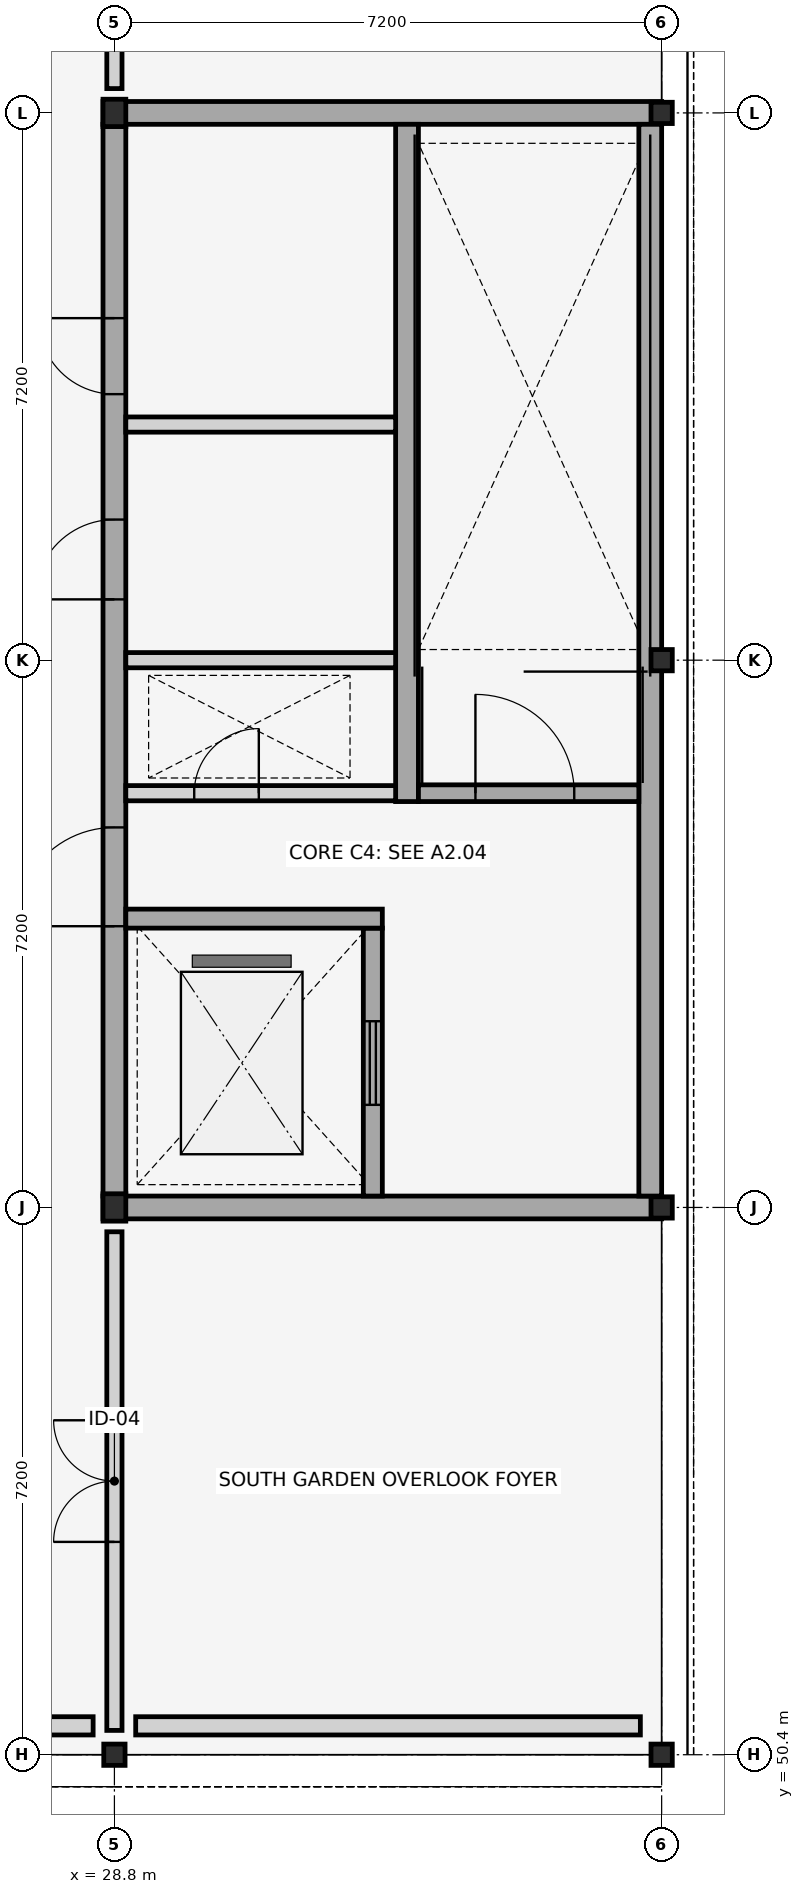
"""IFC4 building model, lengths in metres.
Left out: names, types, materials, properties, quantities, classifications, styles, units other than length and angle.
Written with IfcOpenShell. Run it as: python <this file> out.ifc"""

import sys

from ifc_helpers import new_model, si_unit, direction, frame, frame_2d, origin, origin_2d, place, context, subcontext, project, spatial, rectangle, i_section, extrude, element, fill, save


model = new_model("IFC4")
c1 = context("Model", 3, precision=1e-05, world=origin(), true_north=direction((0.0, 1.0)))
c2 = subcontext(c1, "Body", "Model", "MODEL_VIEW")
j1 = project(units=[si_unit("LENGTHUNIT", "METRE"), si_unit("PLANEANGLEUNIT", "RADIAN")], contexts=[c1])
p1 = place(None, origin())
s1 = spatial("IfcSite", under=j1, at=p1, CompositionType="ELEMENT")
p2 = place(p1, origin())
s2 = spatial("IfcBuilding", under=s1, at=p2, CompositionType="ELEMENT")
p3 = place(p2, frame((0.0, 0.0, 12.9)))
s3 = spatial("IfcBuildingStorey", under=s2, at=p3, CompositionType="ELEMENT", Elevation=12.9)
p4 = place(p3, frame((28.8, 50.4, 0.0), z_axis=(0.0, 0.0, 1.0), x_axis=(0.0, 1.0, 0.0)))
e1 = element("IfcColumn", 1, at=p4, inside=s3, PredefinedType="COLUMN", context=c2, shape_type="SweptSolid", body=[
    extrude(i_section(OverallWidth=0.28, OverallDepth=0.28, WebThickness=0.01, FlangeThickness=0.018, FilletRadius=0.024, at=origin_2d()), origin(), (0.0, 0.0, 1.0), 4.2),
])
for number, where, z_axis, x_axis in (
    (2, (28.8, 57.6, 0.0), (0.0, 0.0, 1.0), (1.0, 0.0, 0.0)),
    (3, (28.8, 72.0, 0.0), (0.0, 0.0, 1.0), (1.0, 0.0, 0.0)),
):
    element("IfcColumn", number, at=place(p3, frame(where, z_axis=z_axis, x_axis=x_axis)), inside=s3, PredefinedType="COLUMN", context=c2, shape_type="SweptSolid", body=[
        extrude(i_section(OverallWidth=0.3, OverallDepth=0.36, WebThickness=0.012, FlangeThickness=0.022, FilletRadius=0.027, at=origin_2d()), origin(), (0.0, 0.0, 1.0), 4.2),
    ])
for number, where, z_axis, x_axis in (
    (4, (36.0, 50.4, 0.0), (0.0, 0.0, 1.0), (1.0, 0.0, 0.0)),
    (5, (36.0, 57.6, 0.0), (0.0, 0.0, 1.0), (0.0, 1.0, 0.0)),
    (6, (36.0, 64.8, 0.0), (0.0, 0.0, 1.0), (1.0, 0.0, 0.0)),
    (7, (36.0, 72.0, 0.0), (0.0, 0.0, 1.0), (0.0, 1.0, 0.0)),
):
    element("IfcColumn", number, at=place(p3, frame(where, z_axis=z_axis, x_axis=x_axis)), inside=s3, PredefinedType="COLUMN", context=c2, shape_type="SweptSolid", body=[
        extrude(i_section(OverallWidth=0.28, OverallDepth=0.28, WebThickness=0.01, FlangeThickness=0.018, FilletRadius=0.024, at=origin_2d()), origin(), (0.0, 0.0, 1.0), 4.2),
    ])
p5 = place(p3, frame((21.88, 50.78, 0.0), z_axis=(0.0, 0.0, 1.0), x_axis=(1.0, 0.0, 0.0)))
e8 = element("IfcWall", 8, at=p5, inside=s3, PredefinedType="STANDARD", context=c2, shape_type="SweptSolid", body=[
    extrude(rectangle(XDim=6.64, YDim=0.24, at=frame_2d((3.32, 0.0))), origin(), (0.0, 0.0, 1.0), 3.58),
])
p6 = place(p3, frame((29.08, 50.78, 0.0), z_axis=(0.0, 0.0, 1.0), x_axis=(1.0, 0.0, 0.0)))
e9 = element("IfcWall", 9, at=p6, inside=s3, PredefinedType="STANDARD", context=c2, shape_type="SweptSolid", body=[
    extrude(rectangle(XDim=6.64, YDim=0.24, at=frame_2d((3.32, 0.0))), origin(), (0.0, 0.0, 1.0), 3.58),
])
for number, where, z_axis, x_axis in (
    (10, (28.65, 57.6, 0.0), (0.0, 0.0, 1.0), (1.0, 0.0, 0.0)),
    (11, (28.65, 72.0, 0.0), (0.0, 0.0, 1.0), (1.0, 0.0, 0.0)),
):
    element("IfcWall", number, at=place(p3, frame(where, z_axis=z_axis, x_axis=x_axis)), inside=s3, PredefinedType="SHEAR", context=c2, shape_type="SweptSolid", body=[
        extrude(rectangle(XDim=7.35, YDim=0.3, at=frame_2d((3.675, 0.0))), origin(), (0.0, 0.0, 1.0), 3.96),
    ])
p7 = place(p3, frame((35.85, 57.75, 0.0), z_axis=(0.0, 0.0, 1.0), x_axis=(0.0, 1.0, 0.0)))
e12 = element("IfcWall", 12, at=p7, inside=s3, PredefinedType="SHEAR", context=c2, shape_type="SweptSolid", body=[
    extrude(rectangle(XDim=14.1, YDim=0.3, at=frame_2d((7.05, 0.0))), origin(), (0.0, 0.0, 1.0), 3.96),
])
p8 = place(p3, frame((28.8, 57.75, 0.0), z_axis=(0.0, 0.0, 1.0), x_axis=(0.0, 1.0, 0.0)))
e13 = element("IfcWall", 13, at=p8, inside=s3, PredefinedType="SHEAR", context=c2, shape_type="SweptSolid", body=[
    extrude(rectangle(XDim=14.1, YDim=0.3, at=frame_2d((7.05, 0.0))), origin(), (0.0, 0.0, 1.0), 3.96),
])
p9 = place(p8, frame((3.55, 0.0, 0.0)))
e14 = element("IfcOpeningElement", 14, at=p9, cuts=e13, PredefinedType="OPENING", context=c2, shape_type="SweptSolid", body=[
    extrude(rectangle(XDim=1.3, YDim=2.2, at=frame_2d((0.65, 1.1))), frame((0.0, 0.16, 0.0), z_axis=(0.0, -1.0, 0.0), x_axis=(1.0, 0.0, 0.0)), (0.0, 0.0, 1.0), 0.32),
])
p10 = place(p8, frame((7.85, 0.0, 0.0)))
e15 = element("IfcOpeningElement", 15, at=p10, cuts=e13, PredefinedType="OPENING", context=c2, shape_type="SweptSolid", body=[
    extrude(rectangle(XDim=1.05, YDim=2.15, at=frame_2d((0.525, 1.075))), frame((0.0, 0.16, 0.0), z_axis=(0.0, -1.0, 0.0), x_axis=(1.0, 0.0, 0.0)), (0.0, 0.0, 1.0), 0.32),
])
p11 = place(p8, frame((10.55, 0.0, 0.0)))
e16 = element("IfcOpeningElement", 16, at=p11, cuts=e13, PredefinedType="OPENING", context=c2, shape_type="SweptSolid", body=[
    extrude(rectangle(XDim=1.0, YDim=2.15, at=frame_2d((0.5, 1.075))), frame((0.0, 0.16, 0.0), z_axis=(0.0, -1.0, 0.0), x_axis=(1.0, 0.0, 0.0)), (0.0, 0.0, 1.0), 0.32),
])
p12 = place(p3, frame((32.2, 57.75, 0.0), z_axis=(0.0, 0.0, 1.0), x_axis=(0.0, 1.0, 0.0)))
e17 = element("IfcWall", 17, at=p12, inside=s3, PredefinedType="SHEAR", context=c2, shape_type="SweptSolid", body=[
    extrude(rectangle(XDim=3.525, YDim=0.25, at=frame_2d((1.762, 0.0))), origin(), (0.0, 0.0, 1.0), 3.96),
])
p13 = place(p12, frame((1.2, 0.0, 0.0)))
e18 = element("IfcOpeningElement", 18, at=p13, cuts=e17, PredefinedType="OPENING", context=c2, shape_type="SweptSolid", body=[
    extrude(rectangle(XDim=1.1, YDim=2.15, at=frame_2d((0.55, 1.075))), frame((0.0, 0.135, 0.0), z_axis=(0.0, -1.0, 0.0), x_axis=(1.0, 0.0, 0.0)), (0.0, 0.0, 1.0), 0.27),
])
p14 = place(p3, frame((32.65, 62.94, 0.0), z_axis=(0.0, 0.0, 1.0), x_axis=(0.0, 1.0, 0.0)))
e19 = element("IfcWall", 19, at=p14, inside=s3, PredefinedType="SHEAR", context=c2, shape_type="SweptSolid", body=[
    extrude(rectangle(XDim=8.91, YDim=0.3, at=frame_2d((4.455, 0.0))), origin(), (0.0, 0.0, 1.0), 3.96),
])
p15 = place(p3, frame((28.95, 63.05, 0.0), z_axis=(0.0, 0.0, 1.0), x_axis=(1.0, 0.0, 0.0)))
e20 = element("IfcWall", 20, at=p15, inside=s3, PredefinedType="PLUMBINGWALL", context=c2, shape_type="SweptSolid", body=[
    extrude(rectangle(XDim=3.55, YDim=0.2, at=frame_2d((1.775, 0.0))), origin(), (0.0, 0.0, 1.0), 3.38),
])
p16 = place(p15, frame((0.9, 0.0, 0.0)))
e21 = element("IfcOpeningElement", 21, at=p16, cuts=e20, PredefinedType="OPENING", context=c2, shape_type="SweptSolid", body=[
    extrude(rectangle(XDim=0.85, YDim=2.05, at=frame_2d((0.425, 1.025))), frame((0.0, 0.11, 0.0), z_axis=(0.0, -1.0, 0.0), x_axis=(1.0, 0.0, 0.0)), (0.0, 0.0, 1.0), 0.22),
])
p17 = place(p3, frame((32.8, 63.05, 0.0), z_axis=(0.0, 0.0, 1.0), x_axis=(1.0, 0.0, 0.0)))
e22 = element("IfcWall", 22, at=p17, inside=s3, PredefinedType="SHEAR", context=c2, shape_type="SweptSolid", body=[
    extrude(rectangle(XDim=2.9, YDim=0.22, at=frame_2d((1.45, 0.0))), origin(), (0.0, 0.0, 1.0), 3.96),
])
p18 = place(p17, frame((0.75, 0.0, 0.0)))
e23 = element("IfcOpeningElement", 23, at=p18, cuts=e22, PredefinedType="OPENING", context=c2, shape_type="SweptSolid", body=[
    extrude(rectangle(XDim=1.3, YDim=2.2, at=frame_2d((0.65, 1.1))), frame((0.0, 0.12, 0.0), z_axis=(0.0, -1.0, 0.0), x_axis=(1.0, 0.0, 0.0)), (0.0, 0.0, 1.0), 0.24),
])
p19 = place(p3, frame((28.95, 61.4, 0.0), z_axis=(0.0, 0.0, 1.0), x_axis=(1.0, 0.0, 0.0)))
e24 = element("IfcWall", 24, at=p19, inside=s3, PredefinedType="SHEAR", context=c2, shape_type="SweptSolid", body=[
    extrude(rectangle(XDim=3.375, YDim=0.25, at=frame_2d((1.688, 0.0))), origin(), (0.0, 0.0, 1.0), 3.96),
])
for number, where, z_axis, x_axis in (
    (25, (28.95, 64.8, 0.0), (0.0, 0.0, 1.0), (1.0, 0.0, 0.0)),
    (26, (28.95, 67.9, 0.0), (0.0, 0.0, 1.0), (1.0, 0.0, 0.0)),
):
    element("IfcWall", number, at=place(p3, frame(where, z_axis=z_axis, x_axis=x_axis)), inside=s3, PredefinedType="PLUMBINGWALL", context=c2, shape_type="SweptSolid", body=[
        extrude(rectangle(XDim=3.55, YDim=0.2, at=frame_2d((1.775, 0.0))), origin(), (0.0, 0.0, 1.0), 3.38),
    ])
p20 = place(p3, frame((28.8, 72.32, 0.0), z_axis=(0.0, 0.0, 1.0), x_axis=(0.0, 1.0, 0.0)))
e27 = element("IfcWall", 27, at=p20, inside=s3, PredefinedType="PARTITIONING", context=c2, shape_type="SweptSolid", body=[
    extrude(rectangle(XDim=20.96, YDim=0.2, at=frame_2d((10.48, 0.0))), origin(), (0.0, 0.0, 1.0), 3.15),
])
p21 = place(p20, frame((9.73, 0.0, 0.0)))
e28 = element("IfcOpeningElement", 28, at=p21, cuts=e27, PredefinedType="OPENING", context=c2, shape_type="SweptSolid", body=[
    extrude(rectangle(XDim=1.5, YDim=2.25, at=frame_2d((0.75, 1.125))), frame((0.0, 0.11, 0.0), z_axis=(0.0, -1.0, 0.0), x_axis=(1.0, 0.0, 0.0)), (0.0, 0.0, 1.0), 0.22),
])
p22 = place(p3, frame((28.8, 50.72, 0.0), z_axis=(0.0, 0.0, 1.0), x_axis=(0.0, 1.0, 0.0)))
e29 = element("IfcWall", 29, at=p22, inside=s3, PredefinedType="PARTITIONING", context=c2, shape_type="SweptSolid", body=[
    extrude(rectangle(XDim=6.56, YDim=0.2, at=frame_2d((3.28, 0.0))), origin(), (0.0, 0.0, 1.0), 3.15),
])
p23 = place(p22, frame((2.48, 0.0, 0.0)))
e30 = element("IfcOpeningElement", 30, at=p23, cuts=e29, PredefinedType="OPENING", context=c2, shape_type="SweptSolid", body=[
    extrude(rectangle(XDim=1.6, YDim=2.35, at=frame_2d((0.8, 1.175))), frame((0.0, 0.11, 0.0), z_axis=(0.0, -1.0, 0.0), x_axis=(1.0, 0.0, 0.0)), (0.0, 0.0, 1.0), 0.22),
])
p24 = place(p9, origin())
e31 = element("IfcDoor", 31, at=p24, inside=s3, OperationType="SINGLE_SWING_LEFT", PredefinedType="DOOR", context=c2, shape_type="SweptSolid", body=[
    extrude(rectangle(XDim=1.3, YDim=2.2, at=frame_2d((0.65, 1.1))), frame((0.0, 0.025, 0.0), z_axis=(0.0, -1.0, 0.0), x_axis=(1.0, 0.0, 0.0)), (0.0, 0.0, 1.0), 0.05),
])
fill(e14, e31)
p25 = place(p10, origin())
e32 = element("IfcDoor", 32, at=p25, inside=s3, OperationType="SINGLE_SWING_LEFT", PredefinedType="DOOR", context=c2, shape_type="SweptSolid", body=[
    extrude(rectangle(XDim=1.05, YDim=2.15, at=frame_2d((0.525, 1.075))), frame((0.0, 0.025, 0.0), z_axis=(0.0, -1.0, 0.0), x_axis=(1.0, 0.0, 0.0)), (0.0, 0.0, 1.0), 0.05),
])
fill(e15, e32)
p26 = place(p11, origin())
e33 = element("IfcDoor", 33, at=p26, inside=s3, OperationType="SINGLE_SWING_RIGHT", PredefinedType="DOOR", context=c2, shape_type="SweptSolid", body=[
    extrude(rectangle(XDim=1.0, YDim=2.15, at=frame_2d((0.5, 1.075))), frame((0.0, 0.025, 0.0), z_axis=(0.0, -1.0, 0.0), x_axis=(1.0, 0.0, 0.0)), (0.0, 0.0, 1.0), 0.05),
])
fill(e16, e33)
p27 = place(p13, origin())
e34 = element("IfcDoor", 34, at=p27, inside=s3, OperationType="SLIDING_TO_LEFT", PredefinedType="DOOR", context=c2, shape_type="SweptSolid", body=[
    extrude(rectangle(XDim=1.1, YDim=2.15, at=frame_2d((0.55, 1.075))), frame((0.0, 0.025, 0.0), z_axis=(0.0, -1.0, 0.0), x_axis=(1.0, 0.0, 0.0)), (0.0, 0.0, 1.0), 0.05),
])
fill(e18, e34)
p28 = place(p16, origin())
e35 = element("IfcDoor", 35, at=p28, inside=s3, OperationType="SINGLE_SWING_RIGHT", PredefinedType="TRAPDOOR", context=c2, shape_type="SweptSolid", body=[
    extrude(rectangle(XDim=0.85, YDim=2.05, at=frame_2d((0.425, 1.025))), frame((0.0, 0.025, 0.0), z_axis=(0.0, -1.0, 0.0), x_axis=(1.0, 0.0, 0.0)), (0.0, 0.0, 1.0), 0.05),
])
fill(e21, e35)
p29 = place(p18, origin())
e36 = element("IfcDoor", 36, at=p29, inside=s3, OperationType="SINGLE_SWING_LEFT", PredefinedType="DOOR", context=c2, shape_type="SweptSolid", body=[
    extrude(rectangle(XDim=1.3, YDim=2.2, at=frame_2d((0.65, 1.1))), frame((0.0, 0.025, 0.0), z_axis=(0.0, -1.0, 0.0), x_axis=(1.0, 0.0, 0.0)), (0.0, 0.0, 1.0), 0.05),
])
fill(e23, e36)
p30 = place(p23, origin())
e37 = element("IfcDoor", 37, at=p30, inside=s3, OperationType="DOUBLE_DOOR_SINGLE_SWING", PredefinedType="DOOR", context=c2, shape_type="SweptSolid", body=[
    extrude(rectangle(XDim=1.6, YDim=2.35, at=frame_2d((0.8, 1.175))), frame((0.0, 0.025, 0.0), z_axis=(0.0, -1.0, 0.0), x_axis=(1.0, 0.0, 0.0)), (0.0, 0.0, 1.0), 0.05),
])
fill(e30, e37)
save(model, sys.argv[1])
